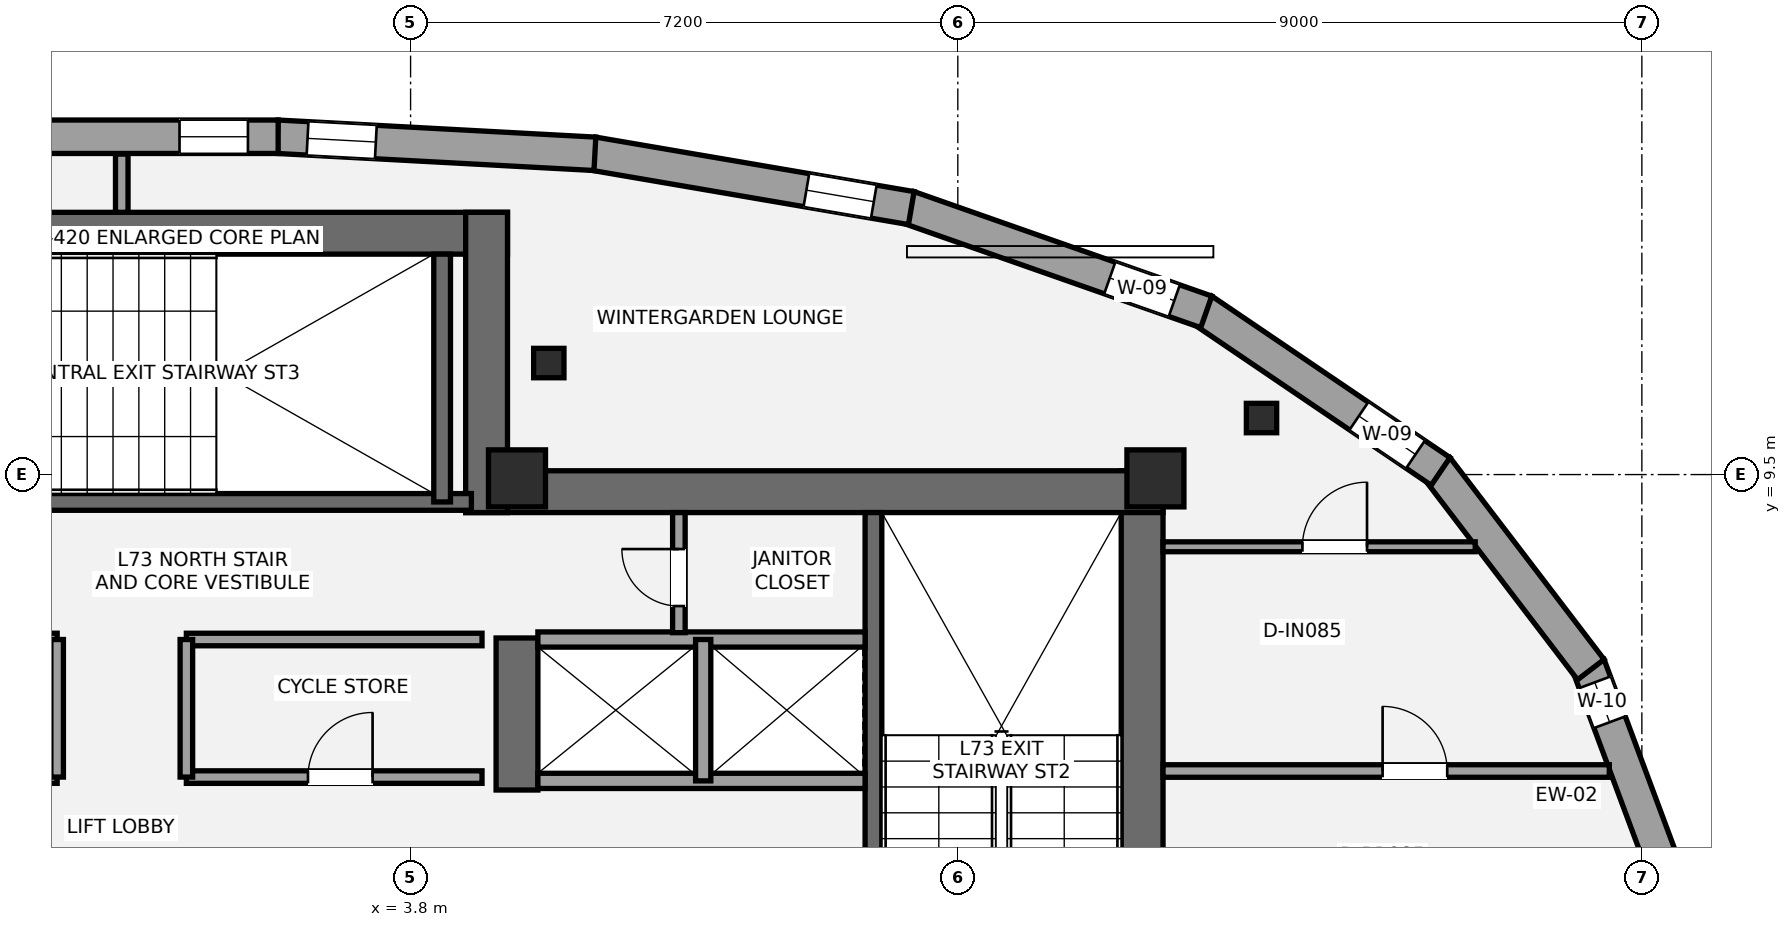
"""IFC4 building model, lengths in metres.
Left out: names, types, materials, properties, quantities, classifications, styles, units other than length and angle.
Written with IfcOpenShell. Run it as: python <this file> out.ifc"""

import sys

from ifc_helpers import new_model, si_unit, direction, frame, frame_2d, origin, origin_2d, place, context, subcontext, project, spatial, rectangle, i_section, extrude, element, fill, save


model = new_model("IFC4")
c1 = context("Model", 3, precision=1e-05, world=origin(), true_north=direction((0.0, 1.0)))
c2 = subcontext(c1, "Body", "Model", "MODEL_VIEW")
j1 = project(units=[si_unit("LENGTHUNIT", "METRE"), si_unit("PLANEANGLEUNIT", "RADIAN")], contexts=[c1])
p1 = place(None, origin())
s1 = spatial("IfcSite", under=j1, at=p1, CompositionType="ELEMENT")
p2 = place(p1, origin())
s2 = spatial("IfcBuilding", under=s1, at=p2, CompositionType="ELEMENT")
p3 = place(p2, frame((0.0, 0.0, 257.25)))
s3 = spatial("IfcBuildingStorey", under=s2, at=p3, CompositionType="ELEMENT", Elevation=257.25)
p4 = place(p3, frame((13.425, 1.3, 0.0), z_axis=(0.0, 0.0, 1.0), x_axis=(0.0, 1.0, 0.0)))
e1 = element("IfcWall", 1, at=p4, inside=s3, PredefinedType="SHEAR", context=c2, shape_type="SweptSolid", body=[
    extrude(rectangle(XDim=8.25, YDim=0.55, at=frame_2d((4.125, 0.0))), origin(), (0.0, 0.0, 1.0), 3.15),
])
p5 = place(p3, frame((4.525, 9.275, 0.0), z_axis=(0.0, 0.0, 1.0), x_axis=(1.0, 0.0, 0.0)))
e2 = element("IfcWall", 2, at=p5, inside=s3, PredefinedType="SHEAR", context=c2, shape_type="SweptSolid", body=[
    extrude(rectangle(XDim=9.175, YDim=0.55, at=frame_2d((4.587, 0.0))), origin(), (0.0, 0.0, 1.0), 3.15),
])
p6 = place(p3, frame((5.2, 5.35, 0.0), z_axis=(0.0, 0.0, 1.0), x_axis=(0.0, 1.0, 0.0)))
e3 = element("IfcWall", 3, at=p6, inside=s3, PredefinedType="SHEAR", context=c2, shape_type="SweptSolid", body=[
    extrude(rectangle(XDim=2.0, YDim=0.55, at=frame_2d((1.0, 0.0))), origin(), (0.0, 0.0, 1.0), 3.15),
])
p7 = place(p3, frame((9.89, 1.85, 0.0), z_axis=(0.0, 0.0, 1.0), x_axis=(0.0, 1.0, 0.0)))
e4 = element("IfcWall", 4, at=p7, inside=s3, PredefinedType="SHEAR", context=c2, shape_type="SweptSolid", body=[
    extrude(rectangle(XDim=7.15, YDim=0.22, at=frame_2d((3.575, 0.0))), origin(), (0.0, 0.0, 1.0), 3.15),
])
p8 = place(p3, frame((-5.075, 12.675, 0.0), z_axis=(0.0, 0.0, 1.0), x_axis=(1.0, 0.0, 0.0)))
e5 = element("IfcWall", 5, at=p8, inside=s3, PredefinedType="SHEAR", context=c2, shape_type="SweptSolid", body=[
    extrude(rectangle(XDim=10.15, YDim=0.55, at=frame_2d((5.075, 0.0))), origin(), (0.0, 0.0, 1.0), 3.15),
])
p9 = place(p3, frame((4.8, 9.0, 0.0), z_axis=(0.0, 0.0, 1.0), x_axis=(0.0, 1.0, 0.0)))
e6 = element("IfcWall", 6, at=p9, inside=s3, PredefinedType="SHEAR", context=c2, shape_type="SweptSolid", body=[
    extrude(rectangle(XDim=3.95, YDim=0.55, at=frame_2d((1.975, 0.0))), origin(), (0.0, 0.0, 1.0), 3.15),
])
p10 = place(p3, frame((-4.7, 9.14, 0.0), z_axis=(0.0, 0.0, 1.0), x_axis=(1.0, 0.0, 0.0)))
e7 = element("IfcWall", 7, at=p10, inside=s3, PredefinedType="SHEAR", context=c2, shape_type="SweptSolid", body=[
    extrude(rectangle(XDim=9.3, YDim=0.22, at=frame_2d((4.65, 0.0))), origin(), (0.0, 0.0, 1.0), 3.15),
])
p11 = place(p10, frame((1.15, 0.0, 0.0)))
e8 = element("IfcOpeningElement", 8, at=p11, cuts=e7, PredefinedType="OPENING", context=c2, shape_type="SweptSolid", body=[
    extrude(rectangle(XDim=1.05, YDim=2.15, at=frame_2d((0.525, 1.075))), frame((0.0, 0.12, 0.0), z_axis=(0.0, -1.0, 0.0), x_axis=(1.0, 0.0, 0.0)), (0.0, 0.0, 1.0), 0.24),
])
p12 = place(p3, frame((4.215, 9.14, 0.0), z_axis=(0.0, 0.0, 1.0), x_axis=(0.0, 1.0, 0.0)))
e9 = element("IfcWall", 9, at=p12, inside=s3, PredefinedType="SHEAR", context=c2, shape_type="SweptSolid", body=[
    extrude(rectangle(XDim=3.26, YDim=0.22, at=frame_2d((1.63, 0.0))), origin(), (0.0, 0.0, 1.0), 3.15),
])
for number, where, z_axis, x_axis in (
    (10, (5.2, 9.45, 0.0), (0.0, 0.0, 1.0), (1.0, 0.0, 0.0)),
    (11, (13.6, 9.45, 0.0), (0.0, 0.0, 1.0), (1.0, 0.0, 0.0)),
):
    element("IfcColumn", number, at=place(p3, frame(where, z_axis=z_axis, x_axis=x_axis)), inside=s3, PredefinedType="PILASTER", context=c2, shape_type="SweptSolid", body=[
        extrude(rectangle(XDim=0.75, YDim=0.75, at=origin_2d()), origin(), (0.0, 0.0, 1.0), 3.15),
    ])
for number, where, z_axis, x_axis in (
    (12, (14.996, 10.244, 0.0), (0.0, 0.0, 1.0), (1.0, 0.0, 0.0)),
    (13, (5.619, 10.967, 0.0), (0.0, 0.0, 1.0), (1.0, 0.0, 0.0)),
):
    element("IfcColumn", number, at=place(p3, frame(where, z_axis=z_axis, x_axis=x_axis)), inside=s3, PredefinedType="COLUMN", context=c2, shape_type="SweptSolid", body=[
        extrude(i_section(OverallWidth=0.399, OverallDepth=0.387, WebThickness=0.021, FlangeThickness=0.033, at=origin_2d()), origin(), (0.0, 0.0, 1.0), 3.15),
    ])
p13 = place(p3, frame((19.297, 6.991, 0.0), z_axis=(0.0, 0.0, 1.0), x_axis=(0.34898554078, -0.937128108813, 0.0)))
e14 = element("IfcWall", 14, at=p13, inside=s3, PredefinedType="STANDARD", context=c2, shape_type="SweptSolid", body=[
    extrude(rectangle(XDim=3.03, YDim=0.44, at=frame_2d((1.515, 0.0))), origin(), (0.0, 0.0, 1.0), 2.296),
])
p14 = place(p13, frame((0.24, 0.0, 0.58)))
e15 = element("IfcOpeningElement", 15, at=p14, cuts=e14, PredefinedType="OPENING", context=c2, shape_type="SweptSolid", body=[
    extrude(rectangle(XDim=0.56, YDim=1.15, at=frame_2d((0.28, 0.575))), frame((0.0, 0.23, 0.0), z_axis=(0.0, -1.0, 0.0), x_axis=(1.0, 0.0, 0.0)), (0.0, 0.0, 1.0), 0.46),
])
p15 = place(p3, frame((17.301, 9.59, 0.0), z_axis=(0.0, 0.0, 1.0), x_axis=(0.606828844818, -0.794832531479, 0.0)))
e16 = element("IfcWall", 16, at=p15, inside=s3, PredefinedType="STANDARD", context=c2, shape_type="SweptSolid", body=[
    extrude(rectangle(XDim=3.341, YDim=0.44, at=frame_2d((1.671, 0.0))), origin(), (0.0, 0.0, 1.0), 2.296),
])
p16 = place(p3, frame((14.218, 11.666, 0.0), z_axis=(0.0, 0.0, 1.0), x_axis=(0.827669406477, -0.561215959842, 0.0)))
e17 = element("IfcWall", 17, at=p16, inside=s3, PredefinedType="STANDARD", context=c2, shape_type="SweptSolid", body=[
    extrude(rectangle(XDim=3.786, YDim=0.44, at=frame_2d((1.893, 0.0))), origin(), (0.0, 0.0, 1.0), 2.296),
])
p17 = place(p16, frame((2.487, 0.0, 0.58)))
e18 = element("IfcOpeningElement", 18, at=p17, cuts=e17, PredefinedType="OPENING", context=c2, shape_type="SweptSolid", body=[
    extrude(rectangle(XDim=0.9, YDim=1.35, at=frame_2d((0.45, 0.675))), frame((0.0, 0.23, 0.0), z_axis=(0.0, -1.0, 0.0), x_axis=(1.0, 0.0, 0.0)), (0.0, 0.0, 1.0), 0.46),
])
p18 = place(p3, frame((10.352, 13.015, 0.0), z_axis=(0.0, 0.0, 1.0), x_axis=(0.943571934891, -0.331167636834, 0.0)))
e19 = element("IfcWall", 19, at=p18, inside=s3, PredefinedType="STANDARD", context=c2, shape_type="SweptSolid", body=[
    extrude(rectangle(XDim=4.151, YDim=0.44, at=frame_2d((2.076, 0.0))), origin(), (0.0, 0.0, 1.0), 2.296),
])
p19 = place(p18, frame((2.805, 0.0, 0.58)))
e20 = element("IfcOpeningElement", 20, at=p19, cuts=e19, PredefinedType="OPENING", context=c2, shape_type="SweptSolid", body=[
    extrude(rectangle(XDim=0.9, YDim=1.35, at=frame_2d((0.45, 0.675))), frame((0.0, 0.23, 0.0), z_axis=(0.0, -1.0, 0.0), x_axis=(1.0, 0.0, 0.0)), (0.0, 0.0, 1.0), 0.46),
])
p20 = place(p3, frame((6.2, 13.723, 0.0), z_axis=(0.0, 0.0, 1.0), x_axis=(0.985667057966, -0.168702254995, 0.0)))
e21 = element("IfcWall", 21, at=p20, inside=s3, PredefinedType="STANDARD", context=c2, shape_type="SweptSolid", body=[
    extrude(rectangle(XDim=4.249, YDim=0.44, at=frame_2d((2.125, 0.0))), origin(), (0.0, 0.0, 1.0), 2.296),
])
p21 = place(p20, frame((2.849, 0.0, 0.58)))
e22 = element("IfcOpeningElement", 22, at=p21, cuts=e21, PredefinedType="OPENING", context=c2, shape_type="SweptSolid", body=[
    extrude(rectangle(XDim=0.9, YDim=1.35, at=frame_2d((0.45, 0.675))), frame((0.0, 0.23, 0.0), z_axis=(0.0, -1.0, 0.0), x_axis=(1.0, 0.0, 0.0)), (0.0, 0.0, 1.0), 0.46),
])
p22 = place(p3, frame((2.046, 13.945, 0.0), z_axis=(0.0, 0.0, 1.0), x_axis=(0.998558880418, -0.053667143941, 0.0)))
e23 = element("IfcWall", 23, at=p22, inside=s3, PredefinedType="STANDARD", context=c2, shape_type="SweptSolid", body=[
    extrude(rectangle(XDim=4.185, YDim=0.44, at=frame_2d((2.093, 0.0))), origin(), (0.0, 0.0, 1.0), 2.296),
])
p23 = place(p22, frame((0.399, 0.0, 0.58)))
e24 = element("IfcOpeningElement", 24, at=p23, cuts=e23, PredefinedType="OPENING", context=c2, shape_type="SweptSolid", body=[
    extrude(rectangle(XDim=0.9, YDim=1.35, at=frame_2d((0.45, 0.675))), frame((0.0, 0.23, 0.0), z_axis=(0.0, -1.0, 0.0), x_axis=(1.0, 0.0, 0.0)), (0.0, 0.0, 1.0), 0.46),
])
p24 = place(p3, frame((-2.058, 13.944, 0.0), z_axis=(0.0, 0.0, 1.0), x_axis=(1.0, 0.0, 0.0)))
e25 = element("IfcWall", 25, at=p24, inside=s3, PredefinedType="STANDARD", context=c2, shape_type="SweptSolid", body=[
    extrude(rectangle(XDim=4.115, YDim=0.44, at=frame_2d((2.058, 0.0))), origin(), (0.0, 0.0, 1.0), 2.296),
])
p25 = place(p24, frame((2.818, 0.0, 0.58)))
e26 = element("IfcOpeningElement", 26, at=p25, cuts=e25, PredefinedType="OPENING", context=c2, shape_type="SweptSolid", body=[
    extrude(rectangle(XDim=0.9, YDim=1.35, at=frame_2d((0.45, 0.675))), frame((0.0, 0.23, 0.0), z_axis=(0.0, -1.0, 0.0), x_axis=(1.0, 0.0, 0.0)), (0.0, 0.0, 1.0), 0.46),
])
for number, where, z_axis, x_axis in (
    (27, (5.475, 5.47, 0.0), (0.0, 0.0, 1.0), (1.0, 0.0, 0.0)),
    (28, (5.475, 7.33, 0.0), (0.0, 0.0, 1.0), (1.0, 0.0, 0.0)),
):
    element("IfcWall", number, at=place(p3, frame(where, z_axis=z_axis, x_axis=x_axis)), inside=s3, PredefinedType="SOLIDWALL", context=c2, shape_type="SweptSolid", body=[
        extrude(rectangle(XDim=4.305, YDim=0.2, at=frame_2d((2.152, 0.0))), origin(), (0.0, 0.0, 1.0), 2.93),
    ])
p26 = place(p3, frame((7.65, 5.47, 0.0), z_axis=(0.0, 0.0, 1.0), x_axis=(0.0, 1.0, 0.0)))
e29 = element("IfcWall", 29, at=p26, inside=s3, PredefinedType="SOLIDWALL", context=c2, shape_type="SweptSolid", body=[
    extrude(rectangle(XDim=1.86, YDim=0.2, at=frame_2d((0.93, 0.0))), origin(), (0.0, 0.0, 1.0), 2.93),
])
p27 = place(p3, frame((-4.74, 5.52, 0.0), z_axis=(0.0, 0.0, 1.0), x_axis=(1.0, 0.0, 0.0)))
e30 = element("IfcWall", 30, at=p27, inside=s3, PredefinedType="PARTITIONING", context=c2, shape_type="SweptSolid", body=[
    extrude(rectangle(XDim=3.89, YDim=0.165, at=frame_2d((1.945, 0.0))), origin(), (0.0, 0.0, 1.0), 2.93),
])
p28 = place(p27, frame((1.6, 0.0, 0.0)))
e31 = element("IfcOpeningElement", 31, at=p28, cuts=e30, PredefinedType="OPENING", context=c2, shape_type="SweptSolid", body=[
    extrude(rectangle(XDim=0.85, YDim=2.1, at=frame_2d((0.425, 1.05))), frame((0.0, 0.093, 0.0), z_axis=(0.0, -1.0, 0.0), x_axis=(1.0, 0.0, 0.0)), (0.0, 0.0, 1.0), 0.185),
])
p29 = place(p3, frame((-4.74, 7.33, 0.0), z_axis=(0.0, 0.0, 1.0), x_axis=(1.0, 0.0, 0.0)))
e32 = element("IfcWall", 32, at=p29, inside=s3, PredefinedType="PARTITIONING", context=c2, shape_type="SweptSolid", body=[
    extrude(rectangle(XDim=3.89, YDim=0.165, at=frame_2d((1.945, 0.0))), origin(), (0.0, 0.0, 1.0), 2.93),
])
p30 = place(p3, frame((-0.85, 5.52, 0.0), z_axis=(0.0, 0.0, 1.0), x_axis=(0.0, 1.0, 0.0)))
e33 = element("IfcWall", 33, at=p30, inside=s3, PredefinedType="PARTITIONING", context=c2, shape_type="SweptSolid", body=[
    extrude(rectangle(XDim=1.81, YDim=0.165, at=frame_2d((0.905, 0.0))), origin(), (0.0, 0.0, 1.0), 2.93),
])
p31 = place(p3, frame((0.85, 5.52, 0.0), z_axis=(0.0, 0.0, 1.0), x_axis=(1.0, 0.0, 0.0)))
e34 = element("IfcWall", 34, at=p31, inside=s3, PredefinedType="PARTITIONING", context=c2, shape_type="SweptSolid", body=[
    extrude(rectangle(XDim=3.89, YDim=0.165, at=frame_2d((1.945, 0.0))), origin(), (0.0, 0.0, 1.0), 2.93),
])
p32 = place(p31, frame((1.6, 0.0, 0.0)))
e35 = element("IfcOpeningElement", 35, at=p32, cuts=e34, PredefinedType="OPENING", context=c2, shape_type="SweptSolid", body=[
    extrude(rectangle(XDim=0.85, YDim=2.1, at=frame_2d((0.425, 1.05))), frame((0.0, 0.093, 0.0), z_axis=(0.0, -1.0, 0.0), x_axis=(1.0, 0.0, 0.0)), (0.0, 0.0, 1.0), 0.185),
])
p33 = place(p3, frame((0.85, 7.33, 0.0), z_axis=(0.0, 0.0, 1.0), x_axis=(1.0, 0.0, 0.0)))
e36 = element("IfcWall", 36, at=p33, inside=s3, PredefinedType="PARTITIONING", context=c2, shape_type="SweptSolid", body=[
    extrude(rectangle(XDim=3.89, YDim=0.165, at=frame_2d((1.945, 0.0))), origin(), (0.0, 0.0, 1.0), 2.93),
])
p34 = place(p3, frame((0.85, 5.52, 0.0), z_axis=(0.0, 0.0, 1.0), x_axis=(0.0, 1.0, 0.0)))
e37 = element("IfcWall", 37, at=p34, inside=s3, PredefinedType="PARTITIONING", context=c2, shape_type="SweptSolid", body=[
    extrude(rectangle(XDim=1.81, YDim=0.165, at=frame_2d((0.905, 0.0))), origin(), (0.0, 0.0, 1.0), 2.93),
])
p35 = place(p3, frame((7.33, 7.42, 0.0), z_axis=(0.0, 0.0, 1.0), x_axis=(0.0, 1.0, 0.0)))
e38 = element("IfcWall", 38, at=p35, inside=s3, PredefinedType="PARTITIONING", context=c2, shape_type="SweptSolid", body=[
    extrude(rectangle(XDim=1.58, YDim=0.165, at=frame_2d((0.79, 0.0))), origin(), (0.0, 0.0, 1.0), 2.93),
])
p36 = place(p35, frame((0.35, 0.0, 0.0)))
e39 = element("IfcOpeningElement", 39, at=p36, cuts=e38, PredefinedType="OPENING", context=c2, shape_type="SweptSolid", body=[
    extrude(rectangle(XDim=0.75, YDim=2.1, at=frame_2d((0.375, 1.05))), frame((0.0, 0.093, 0.0), z_axis=(0.0, -1.0, 0.0), x_axis=(1.0, 0.0, 0.0)), (0.0, 0.0, 1.0), 0.185),
])
p37 = place(p3, frame((0.0, 12.95, 0.0), z_axis=(0.0, 0.0, 1.0), x_axis=(0.0, 1.0, 0.0)))
e40 = element("IfcWall", 40, at=p37, inside=s3, PredefinedType="PARTITIONING", context=c2, shape_type="SweptSolid", body=[
    extrude(rectangle(XDim=0.766, YDim=0.165, at=frame_2d((0.383, 0.0))), origin(), (0.0, 0.0, 1.0), 2.93),
])
p38 = place(p3, frame((13.7, 5.6, 0.0), z_axis=(0.0, 0.0, 1.0), x_axis=(1.0, 0.0, 0.0)))
e41 = element("IfcWall", 41, at=p38, inside=s3, PredefinedType="PARTITIONING", context=c2, shape_type="SweptSolid", body=[
    extrude(rectangle(XDim=5.872, YDim=0.165, at=frame_2d((2.936, 0.0))), origin(), (0.0, 0.0, 1.0), 2.383),
])
p39 = place(p38, frame((2.889, 0.0, 0.0)))
e42 = element("IfcOpeningElement", 42, at=p39, cuts=e41, PredefinedType="OPENING", context=c2, shape_type="SweptSolid", body=[
    extrude(rectangle(XDim=0.85, YDim=2.1, at=frame_2d((0.425, 1.05))), frame((0.0, 0.093, 0.0), z_axis=(0.0, -1.0, 0.0), x_axis=(1.0, 0.0, 0.0)), (0.0, 0.0, 1.0), 0.185),
])
p40 = place(p3, frame((13.7, 8.55, 0.0), z_axis=(0.0, 0.0, 1.0), x_axis=(1.0, 0.0, 0.0)))
e43 = element("IfcWall", 43, at=p40, inside=s3, PredefinedType="PARTITIONING", context=c2, shape_type="SweptSolid", body=[
    extrude(rectangle(XDim=4.108, YDim=0.13, at=frame_2d((2.054, 0.0))), origin(), (0.0, 0.0, 1.0), 2.383),
])
p41 = place(p40, frame((1.834, 0.0, 0.0)))
e44 = element("IfcOpeningElement", 44, at=p41, cuts=e43, PredefinedType="OPENING", context=c2, shape_type="SweptSolid", body=[
    extrude(rectangle(XDim=0.85, YDim=2.1, at=frame_2d((0.425, 1.05))), frame((0.0, 0.075, 0.0), z_axis=(0.0, -1.0, 0.0), x_axis=(1.0, 0.0, 0.0)), (0.0, 0.0, 1.0), 0.15),
])
p42 = place(p17, origin())
e45 = element("IfcWindow", 45, at=p42, inside=s3, PartitioningType="SINGLE_PANEL", PredefinedType="WINDOW", context=c2, shape_type="SweptSolid", body=[
    extrude(rectangle(XDim=0.9, YDim=1.35, at=frame_2d((0.45, 0.675))), frame((0.0, -0.01, 0.0), z_axis=(0.0, -1.0, 0.0), x_axis=(1.0, 0.0, 0.0)), (0.0, 0.0, 1.0), 0.06),
])
fill(e18, e45)
p43 = place(p19, origin())
e46 = element("IfcWindow", 46, at=p43, inside=s3, PartitioningType="SINGLE_PANEL", PredefinedType="WINDOW", context=c2, shape_type="SweptSolid", body=[
    extrude(rectangle(XDim=0.9, YDim=1.35, at=frame_2d((0.45, 0.675))), frame((0.0, -0.01, 0.0), z_axis=(0.0, -1.0, 0.0), x_axis=(1.0, 0.0, 0.0)), (0.0, 0.0, 1.0), 0.06),
])
fill(e20, e46)
p44 = place(p21, origin())
e47 = element("IfcWindow", 47, at=p44, inside=s3, PartitioningType="SINGLE_PANEL", PredefinedType="WINDOW", context=c2, shape_type="SweptSolid", body=[
    extrude(rectangle(XDim=0.9, YDim=1.35, at=frame_2d((0.45, 0.675))), frame((0.0, -0.01, 0.0), z_axis=(0.0, -1.0, 0.0), x_axis=(1.0, 0.0, 0.0)), (0.0, 0.0, 1.0), 0.06),
])
fill(e22, e47)
p45 = place(p23, origin())
e48 = element("IfcWindow", 48, at=p45, inside=s3, PartitioningType="SINGLE_PANEL", PredefinedType="WINDOW", context=c2, shape_type="SweptSolid", body=[
    extrude(rectangle(XDim=0.9, YDim=1.35, at=frame_2d((0.45, 0.675))), frame((0.0, -0.01, 0.0), z_axis=(0.0, -1.0, 0.0), x_axis=(1.0, 0.0, 0.0)), (0.0, 0.0, 1.0), 0.06),
])
fill(e24, e48)
p46 = place(p25, origin())
e49 = element("IfcWindow", 49, at=p46, inside=s3, PartitioningType="SINGLE_PANEL", PredefinedType="WINDOW", context=c2, shape_type="SweptSolid", body=[
    extrude(rectangle(XDim=0.9, YDim=1.35, at=frame_2d((0.45, 0.675))), frame((0.0, -0.01, 0.0), z_axis=(0.0, -1.0, 0.0), x_axis=(1.0, 0.0, 0.0)), (0.0, 0.0, 1.0), 0.06),
])
fill(e26, e49)
p47 = place(p14, origin())
e50 = element("IfcWindow", 50, at=p47, inside=s3, PartitioningType="SINGLE_PANEL", PredefinedType="WINDOW", context=c2, shape_type="SweptSolid", body=[
    extrude(rectangle(XDim=0.56, YDim=1.15, at=frame_2d((0.28, 0.575))), frame((0.0, -0.01, 0.0), z_axis=(0.0, -1.0, 0.0), x_axis=(1.0, 0.0, 0.0)), (0.0, 0.0, 1.0), 0.06),
])
fill(e15, e50)
p48 = place(p32, origin())
e51 = element("IfcDoor", 51, at=p48, inside=s3, OperationType="SINGLE_SWING_RIGHT", PredefinedType="DOOR", context=c2, shape_type="SweptSolid", body=[
    extrude(rectangle(XDim=0.85, YDim=2.1, at=frame_2d((0.425, 1.05))), frame((0.0, 0.025, 0.0), z_axis=(0.0, -1.0, 0.0), x_axis=(1.0, 0.0, 0.0)), (0.0, 0.0, 1.0), 0.05),
])
fill(e35, e51)
p49 = place(p36, origin())
e52 = element("IfcDoor", 52, at=p49, inside=s3, OperationType="SINGLE_SWING_RIGHT", PredefinedType="DOOR", context=c2, shape_type="SweptSolid", body=[
    extrude(rectangle(XDim=0.75, YDim=2.1, at=frame_2d((0.375, 1.05))), frame((0.0, 0.025, 0.0), z_axis=(0.0, -1.0, 0.0), x_axis=(1.0, 0.0, 0.0)), (0.0, 0.0, 1.0), 0.05),
])
fill(e39, e52)
p50 = place(p39, origin())
e53 = element("IfcDoor", 53, at=p50, inside=s3, OperationType="SINGLE_SWING_LEFT", PredefinedType="DOOR", context=c2, shape_type="SweptSolid", body=[
    extrude(rectangle(XDim=0.85, YDim=2.1, at=frame_2d((0.425, 1.05))), frame((0.0, 0.025, 0.0), z_axis=(0.0, -1.0, 0.0), x_axis=(1.0, 0.0, 0.0)), (0.0, 0.0, 1.0), 0.05),
])
fill(e42, e53)
p51 = place(p41, origin())
e54 = element("IfcDoor", 54, at=p51, inside=s3, OperationType="SINGLE_SWING_RIGHT", PredefinedType="DOOR", context=c2, shape_type="SweptSolid", body=[
    extrude(rectangle(XDim=0.85, YDim=2.1, at=frame_2d((0.425, 1.05))), frame((0.0, 0.025, 0.0), z_axis=(0.0, -1.0, 0.0), x_axis=(1.0, 0.0, 0.0)), (0.0, 0.0, 1.0), 0.05),
])
fill(e44, e54)
save(model, sys.argv[1])
